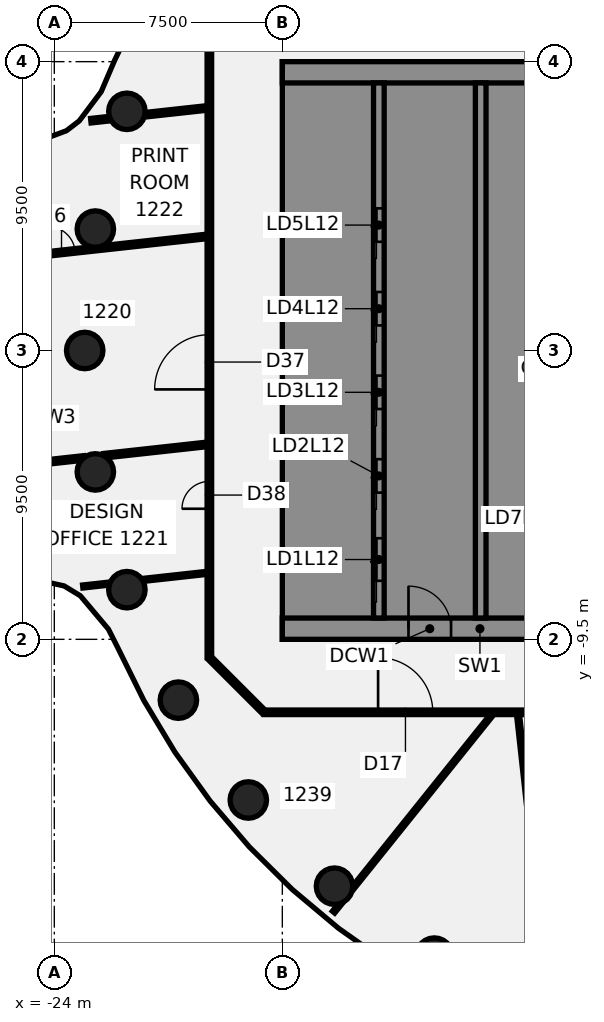
"""IFC4 building model, lengths in metres.
Left out: names, types, materials, properties, quantities, classifications, styles, units other than length and angle.
Written with IfcOpenShell. Run it as: python <this file> out.ifc"""

import sys

from ifc_helpers import new_model, si_unit, direction, frame, frame_2d, origin, origin_2d, place, context, subcontext, project, spatial, polyline, rectangle, circle, outline, extrude, element, fill, save


model = new_model("IFC4")
c1 = context("Model", 3, precision=1e-05, world=origin(), true_north=direction((0.0, 1.0)))
c2 = subcontext(c1, "Body", "Model", "MODEL_VIEW")
j1 = project(units=[si_unit("LENGTHUNIT", "METRE"), si_unit("PLANEANGLEUNIT", "RADIAN")], contexts=[c1])
p1 = place(None, origin())
s1 = spatial("IfcSite", under=j1, at=p1, CompositionType="ELEMENT")
p2 = place(p1, origin())
s2 = spatial("IfcBuilding", under=s1, at=p2, CompositionType="ELEMENT")
p3 = place(p2, frame((0.0, 0.0, 56.5)))
s3 = spatial("IfcBuildingStorey", under=s2, at=p3, CompositionType="ELEMENT", Elevation=56.5)
for number, where, z_axis, x_axis in (
    (1, (-21.613, 7.866, -0.14), (0.0, 0.0, 1.0), (1.0, 0.0, 0.0)),
    (2, (-22.651, 3.994, -0.14), (0.0, 0.0, 1.0), (1.0, 0.0, 0.0)),
    (3, (-23.0, 0.0, -0.14), (0.0, 0.0, 1.0), (1.0, 0.0, 0.0)),
    (4, (-22.651, -3.994, -0.14), (0.0, 0.0, 1.0), (1.0, 0.0, 0.0)),
    (5, (-21.613, -7.866, -0.14), (0.0, 0.0, 1.0), (1.0, 0.0, 0.0)),
    (6, (-19.919, -11.5, -0.14), (0.0, 0.0, 1.0), (1.0, 0.0, 0.0)),
    (7, (-17.619, -14.784, -0.14), (0.0, 0.0, 1.0), (1.0, 0.0, 0.0)),
    (8, (-14.784, -17.619, -0.14), (0.0, 0.0, 1.0), (1.0, 0.0, 0.0)),
    (9, (-11.5, -19.919, -0.14), (0.0, 0.0, 1.0), (1.0, 0.0, 0.0)),
):
    element("IfcColumn", number, at=place(p3, frame(where, z_axis=z_axis, x_axis=x_axis)), inside=s3, PredefinedType="COLUMN", context=c2, shape_type="SweptSolid", body=[
        extrude(circle(Radius=0.6, at=origin_2d()), origin(), (0.0, 0.0, 1.0), 3.75),
    ])
p4 = place(p3, frame((-8.748, -11.965, 0.0), z_axis=(0.0, 0.0, 1.0), x_axis=(0.109150907267, -0.994025190547, 0.0)))
e10 = element("IfcWall", 10, at=p4, inside=s3, PredefinedType="PARTITIONING", context=c2, shape_type="SweptSolid", body=[
    extrude(rectangle(XDim=9.124, YDim=0.1, at=frame_2d((4.562, 0.0))), origin(), (0.0, 0.0, 1.0), 3.01),
])
p5 = place(p3, frame((-18.872, -10.128, 0.0), z_axis=(0.0, 0.0, 1.0), x_axis=(0.707106781187, -0.707106781187, 0.0)))
e11 = element("IfcWall", 11, at=p5, inside=s3, PredefinedType="PARTITIONING", context=c2, shape_type="SweptSolid", body=[
    extrude(rectangle(XDim=2.465, YDim=0.15, at=frame_2d((1.232, 0.0))), origin(), (0.0, 0.0, 1.0), 3.01),
])
p6 = place(p3, frame((-17.1, -11.9, 0.0), z_axis=(0.0, 0.0, 1.0), x_axis=(1.0, 0.0, 0.0)))
e12 = element("IfcWall", 12, at=p6, inside=s3, PredefinedType="PARTITIONING", context=c2, shape_type="SweptSolid", body=[
    extrude(rectangle(XDim=34.165, YDim=0.15, at=frame_2d((17.083, 0.0))), origin(), (0.0, 0.0, 1.0), 3.01),
])
p7 = place(p6, frame((15.12, 0.0, 0.0)))
e13 = element("IfcOpeningElement", 13, at=p7, cuts=e12, PredefinedType="OPENING", context=c2, shape_type="SweptSolid", body=[
    extrude(rectangle(XDim=1.8, YDim=2.1, at=frame_2d((0.9, 1.05))), frame((0.0, 0.085, 0.0), z_axis=(0.0, -1.0, 0.0), x_axis=(1.0, 0.0, 0.0)), (0.0, 0.0, 1.0), 0.17),
])
p8 = place(p6, frame((3.75, 0.0, 0.0)))
e14 = element("IfcOpeningElement", 14, at=p8, cuts=e12, PredefinedType="OPENING", context=c2, shape_type="SweptSolid", body=[
    extrude(rectangle(XDim=1.8, YDim=2.1, at=frame_2d((0.9, 1.05))), frame((0.0, 0.085, 0.0), z_axis=(0.0, -1.0, 0.0), x_axis=(1.0, 0.0, 0.0)), (0.0, 0.0, 1.0), 0.17),
])
p9 = place(p6, frame((26.936, 0.0, 0.0)))
e15 = element("IfcOpeningElement", 15, at=p9, cuts=e12, PredefinedType="OPENING", context=c2, shape_type="SweptSolid", body=[
    extrude(rectangle(XDim=1.8, YDim=2.1, at=frame_2d((0.9, 1.05))), frame((0.0, 0.085, 0.0), z_axis=(0.0, -1.0, 0.0), x_axis=(1.0, 0.0, 0.0)), (0.0, 0.0, 1.0), 0.17),
])
p10 = place(p3, frame((-26.05, 2.976, 0.0), z_axis=(0.0, 0.0, 1.0), x_axis=(0.994023698867, 0.109164490982, 0.0)))
e16 = element("IfcWall", 16, at=p10, inside=s3, PredefinedType="PARTITIONING", context=c2, shape_type="SweptSolid", body=[
    extrude(rectangle(XDim=7.127, YDim=0.15, at=frame_2d((3.564, 0.0))), origin(), (0.0, 0.0, 1.0), 3.01),
])
p11 = place(p10, frame((1.85, 0.0, 0.0)))
e17 = element("IfcOpeningElement", 17, at=p11, cuts=e16, PredefinedType="OPENING", context=c2, shape_type="SweptSolid", body=[
    extrude(rectangle(XDim=0.9, YDim=2.1, at=frame_2d((0.45, 1.05))), frame((0.0, 0.085, 0.0), z_axis=(0.0, -1.0, 0.0), x_axis=(1.0, 0.0, 0.0)), (0.0, 0.0, 1.0), 0.17),
])
p12 = place(p3, frame((-25.307, -3.784, 0.0), z_axis=(0.0, 0.0, 1.0), x_axis=(0.994013939251, 0.10925332295, 0.0)))
e18 = element("IfcWall", 18, at=p12, inside=s3, PredefinedType="PARTITIONING", context=c2, shape_type="SweptSolid", body=[
    extrude(rectangle(XDim=2.297, YDim=0.15, at=frame_2d((1.148, 0.0))), origin(), (0.0, 0.0, 1.0), 3.01),
])
p13 = place(p3, frame((-22.364, -3.461, 0.0), z_axis=(0.0, 0.0, 1.0), x_axis=(0.994017073769, 0.109224800551, 0.0)))
e19 = element("IfcWall", 19, at=p13, inside=s3, PredefinedType="PARTITIONING", context=c2, shape_type="SweptSolid", body=[
    extrude(rectangle(XDim=3.42, YDim=0.15, at=frame_2d((1.71, 0.0))), origin(), (0.0, 0.0, 1.0), 3.01),
])
p14 = place(p3, frame((-23.065, -7.763, 0.0), z_axis=(0.0, 0.0, 1.0), x_axis=(0.993995521714, 0.109420760428, 0.0)))
e20 = element("IfcWall", 20, at=p14, inside=s3, PredefinedType="PARTITIONING", context=c2, shape_type="SweptSolid", body=[
    extrude(rectangle(XDim=0.901, YDim=0.1, at=frame_2d((0.451, 0.0))), origin(), (0.0, 0.0, 1.0), 3.01),
])
p15 = place(p3, frame((-21.099, -7.547, 0.0), z_axis=(0.0, 0.0, 1.0), x_axis=(0.994002378956, 0.109358450201, 0.0)))
e21 = element("IfcWall", 21, at=p15, inside=s3, PredefinedType="PARTITIONING", context=c2, shape_type="SweptSolid", body=[
    extrude(rectangle(XDim=2.148, YDim=0.1, at=frame_2d((1.074, 0.0))), origin(), (0.0, 0.0, 1.0), 3.01),
])
p16 = place(p3, frame((-22.799, 7.558, 0.0), z_axis=(0.0, 0.0, 1.0), x_axis=(0.994017126998, 0.10922431613, 0.0)))
e22 = element("IfcWall", 22, at=p16, inside=s3, PredefinedType="PARTITIONING", context=c2, shape_type="SweptSolid", body=[
    extrude(rectangle(XDim=0.644, YDim=0.15, at=frame_2d((0.322, 0.0))), origin(), (0.0, 0.0, 1.0), 3.01),
])
p17 = place(p3, frame((-21.034, 7.752, 0.0), z_axis=(0.0, 0.0, 1.0), x_axis=(0.994020279747, 0.109195620111, 0.0)))
e23 = element("IfcWall", 23, at=p17, inside=s3, PredefinedType="PARTITIONING", context=c2, shape_type="SweptSolid", body=[
    extrude(rectangle(XDim=2.082, YDim=0.15, at=frame_2d((1.041, 0.0))), origin(), (0.0, 0.0, 1.0), 3.01),
])
p18 = place(p3, frame((-14.816, -18.473, 0.0), z_axis=(0.0, 0.0, 1.0), x_axis=(0.625701600065, 0.780062502416, 0.0)))
e24 = element("IfcWall", 24, at=p18, inside=s3, PredefinedType="PARTITIONING", context=c2, shape_type="SweptSolid", body=[
    extrude(rectangle(XDim=0.384, YDim=0.1, at=frame_2d((0.192, 0.0))), origin(), (0.0, 0.0, 1.0), 3.01),
])
p19 = place(p3, frame((-14.196, -17.699, 0.0), z_axis=(0.0, 0.0, 1.0), x_axis=(0.625695219995, 0.780067619938, 0.0)))
e25 = element("IfcWall", 25, at=p19, inside=s3, PredefinedType="PARTITIONING", context=c2, shape_type="SweptSolid", body=[
    extrude(rectangle(XDim=7.319, YDim=0.1, at=frame_2d((3.66, 0.0))), origin(), (0.0, 0.0, 1.0), 3.01),
])
p20 = place(p3, frame((-18.9, -10.1, 0.0), z_axis=(0.0, 0.0, 1.0), x_axis=(0.0, 1.0, 0.0)))
e26 = element("IfcWall", 26, at=p20, inside=s3, PredefinedType="PARTITIONING", context=c2, shape_type="SweptSolid", body=[
    extrude(rectangle(XDim=20.2, YDim=0.15, at=frame_2d((10.1, 0.0))), origin(), (0.0, 0.0, 1.0), 3.01),
])
p21 = place(p20, frame((8.82, 0.0, 0.0)))
e27 = element("IfcOpeningElement", 27, at=p21, cuts=e26, PredefinedType="OPENING", context=c2, shape_type="SweptSolid", body=[
    extrude(rectangle(XDim=1.8, YDim=2.1, at=frame_2d((0.9, 1.05))), frame((0.0, 0.085, 0.0), z_axis=(0.0, -1.0, 0.0), x_axis=(1.0, 0.0, 0.0)), (0.0, 0.0, 1.0), 0.17),
])
p22 = place(p20, frame((4.895, 0.0, 0.0)))
e28 = element("IfcOpeningElement", 28, at=p22, cuts=e26, PredefinedType="OPENING", context=c2, shape_type="SweptSolid", body=[
    extrude(rectangle(XDim=0.9, YDim=2.1, at=frame_2d((0.45, 1.05))), frame((0.0, 0.085, 0.0), z_axis=(0.0, -1.0, 0.0), x_axis=(1.0, 0.0, 0.0)), (0.0, 0.0, 1.0), 0.17),
])
p23 = place(p3, frame((-16.5, -9.15, 0.0), z_axis=(0.0, 0.0, 1.0), x_axis=(1.0, 0.0, 0.0)))
e29 = element("IfcWall", 29, at=p23, inside=s3, PredefinedType="SHEAR", context=c2, shape_type="SweptSolid", body=[
    extrude(rectangle(XDim=13.0, YDim=0.7, at=frame_2d((6.5, 0.0))), origin(), (0.0, 0.0, 1.0), 3.61),
])
p24 = place(p23, frame((4.15, 0.0, 0.0)))
e30 = element("IfcOpeningElement", 30, at=p24, cuts=e29, PredefinedType="OPENING", context=c2, shape_type="SweptSolid", body=[
    extrude(rectangle(XDim=1.4, YDim=2.1, at=frame_2d((0.7, 1.05))), frame((0.0, 0.36, 0.0), z_axis=(0.0, -1.0, 0.0), x_axis=(1.0, 0.0, 0.0)), (0.0, 0.0, 1.0), 0.72),
])
p25 = place(p23, frame((10.125, 0.0, 0.0)))
e31 = element("IfcOpeningElement", 31, at=p25, cuts=e29, PredefinedType="OPENING", context=c2, shape_type="SweptSolid", body=[
    extrude(rectangle(XDim=1.4, YDim=2.1, at=frame_2d((0.7, 1.05))), frame((0.0, 0.36, 0.0), z_axis=(0.0, -1.0, 0.0), x_axis=(1.0, 0.0, 0.0)), (0.0, 0.0, 1.0), 0.72),
])
p26 = place(p3, origin())
e32 = element("IfcWall", 32, at=p26, inside=s3, PredefinedType="SHEAR", context=c2, shape_type="SweptSolid", body=[
    extrude(outline(polyline([(-13.5, -8.8), (-13.5, -8.125), (-15.8, -8.125), (-15.8, -5.625), (-13.5, -5.625), (-13.5, -5.375), (-15.8, -5.375), (-15.8, -2.875), (-13.5, -2.875), (-13.5, -2.625), (-15.8, -2.625), (-15.8, -0.125), (-13.5, -0.125), (-13.5, 0.125), (-15.8, 0.125), (-15.8, 2.625), (-13.5, 2.625), (-13.5, 2.875), (-15.8, 2.875), (-15.8, 5.375), (-13.5, 5.375), (-13.5, 5.625), (-15.8, 5.625), (-15.8, 8.125), (-13.5, 8.125), (-13.5, 8.8), (-15.8, 8.8), (-16.5, 8.8), (-16.5, -8.8), (-15.8, -8.8), (-13.5, -8.8)])), origin(), (0.0, 0.0, 1.0), 3.61),
])
p27 = place(p3, frame((-16.5, 9.15, 0.0), z_axis=(0.0, 0.0, 1.0), x_axis=(1.0, 0.0, 0.0)))
e33 = element("IfcWall", 33, at=p27, inside=s3, PredefinedType="SHEAR", context=c2, shape_type="SweptSolid", body=[
    extrude(rectangle(XDim=13.0, YDim=0.7, at=frame_2d((6.5, 0.0))), origin(), (0.0, 0.0, 1.0), 3.61),
])
p28 = place(p3, origin())
e34 = element("IfcWall", 34, at=p28, inside=s3, PredefinedType="SHEAR", context=c2, shape_type="SweptSolid", body=[
    extrude(outline(polyline([(-9.8, -5.375), (-9.8, -5.625), (-7.5, -5.625), (-7.15, -5.625), (-7.15, 8.8), (-7.5, 8.8), (-9.8, 8.8), (-9.8, 8.125), (-7.5, 8.125), (-7.5, 5.625), (-9.8, 5.625), (-9.8, 5.375), (-7.5, 5.375), (-7.5, 2.875), (-9.8, 2.875), (-9.8, 2.625), (-7.5, 2.625), (-7.5, 0.125), (-9.8, 0.125), (-9.8, -0.125), (-7.5, -0.125), (-7.5, -2.625), (-9.8, -2.625), (-9.8, -2.875), (-7.5, -2.875), (-7.5, -5.375), (-9.8, -5.375)])), origin(), (0.0, 0.0, 1.0), 3.61),
])
p29 = place(p3, origin())
e35 = element("IfcWall", 35, at=p29, inside=s3, PredefinedType="SHEAR", context=c2, shape_type="SweptSolid", body=[
    extrude(outline(polyline([(-7.5, -8.125), (-9.55, -8.125), (-9.55, -5.625), (-9.8, -5.625), (-9.8, -8.125), (-9.8, -8.8), (-7.5, -8.8), (-7.5, -8.125)])), origin(), (0.0, 0.0, 1.0), 3.61),
])
p30 = place(p3, frame((-13.325, -8.8, 0.0), z_axis=(0.0, 0.0, 1.0), x_axis=(0.0, 1.0, 0.0)))
e36 = element("IfcWall", 36, at=p30, inside=s3, PredefinedType="SHEAR", context=c2, shape_type="SweptSolid", body=[
    extrude(rectangle(XDim=17.6, YDim=0.35, at=frame_2d((8.8, 0.0))), origin(), (0.0, 0.0, 1.0), 3.61),
])
p31 = place(p30, frame((1.225, 0.0, 0.0)))
e37 = element("IfcOpeningElement", 37, at=p31, cuts=e36, PredefinedType="OPENING", context=c2, shape_type="SweptSolid", body=[
    extrude(rectangle(XDim=1.4, YDim=2.1, at=frame_2d((0.7, 1.05))), frame((0.0, 0.185, 0.0), z_axis=(0.0, -1.0, 0.0), x_axis=(1.0, 0.0, 0.0)), (0.0, 0.0, 1.0), 0.37),
])
p32 = place(p30, frame((4.125, 0.0, 0.0)))
e38 = element("IfcOpeningElement", 38, at=p32, cuts=e36, PredefinedType="OPENING", context=c2, shape_type="SweptSolid", body=[
    extrude(rectangle(XDim=1.1, YDim=2.1, at=frame_2d((0.55, 1.05))), frame((0.0, 0.185, 0.0), z_axis=(0.0, -1.0, 0.0), x_axis=(1.0, 0.0, 0.0)), (0.0, 0.0, 1.0), 0.37),
])
p33 = place(p30, frame((6.875, 0.0, 0.0)))
e39 = element("IfcOpeningElement", 39, at=p33, cuts=e36, PredefinedType="OPENING", context=c2, shape_type="SweptSolid", body=[
    extrude(rectangle(XDim=1.1, YDim=2.1, at=frame_2d((0.55, 1.05))), frame((0.0, 0.185, 0.0), z_axis=(0.0, -1.0, 0.0), x_axis=(1.0, 0.0, 0.0)), (0.0, 0.0, 1.0), 0.37),
])
p34 = place(p30, frame((9.625, 0.0, 0.0)))
e40 = element("IfcOpeningElement", 40, at=p34, cuts=e36, PredefinedType="OPENING", context=c2, shape_type="SweptSolid", body=[
    extrude(rectangle(XDim=1.1, YDim=2.1, at=frame_2d((0.55, 1.05))), frame((0.0, 0.185, 0.0), z_axis=(0.0, -1.0, 0.0), x_axis=(1.0, 0.0, 0.0)), (0.0, 0.0, 1.0), 0.37),
])
p35 = place(p30, frame((12.375, 0.0, 0.0)))
e41 = element("IfcOpeningElement", 41, at=p35, cuts=e36, PredefinedType="OPENING", context=c2, shape_type="SweptSolid", body=[
    extrude(rectangle(XDim=1.1, YDim=2.1, at=frame_2d((0.55, 1.05))), frame((0.0, 0.185, 0.0), z_axis=(0.0, -1.0, 0.0), x_axis=(1.0, 0.0, 0.0)), (0.0, 0.0, 1.0), 0.37),
])
p36 = place(p3, frame((-9.975, -8.8, 0.0), z_axis=(0.0, 0.0, 1.0), x_axis=(0.0, 1.0, 0.0)))
e42 = element("IfcWall", 42, at=p36, inside=s3, PredefinedType="SHEAR", context=c2, shape_type="SweptSolid", body=[
    extrude(rectangle(XDim=17.6, YDim=0.35, at=frame_2d((8.8, 0.0))), origin(), (0.0, 0.0, 1.0), 3.61),
])
p37 = place(p8, frame((1.8, 0.0, 0.0), z_axis=(0.0, 0.0, 1.0), x_axis=(-1.0, 0.0, 0.0)))
e43 = element("IfcDoor", 43, at=p37, inside=s3, OperationType="DOUBLE_DOOR_SINGLE_SWING", PredefinedType="DOOR", context=c2, shape_type="SweptSolid", body=[
    extrude(rectangle(XDim=1.8, YDim=2.1, at=frame_2d((0.9, 1.05))), frame((0.0, 0.025, 0.0), z_axis=(0.0, -1.0, 0.0), x_axis=(1.0, 0.0, 0.0)), (0.0, 0.0, 1.0), 0.05),
])
fill(e14, e43)
p38 = place(p11, origin())
e44 = element("IfcDoor", 44, at=p38, inside=s3, OperationType="SINGLE_SWING_RIGHT", PredefinedType="DOOR", context=c2, shape_type="SweptSolid", body=[
    extrude(rectangle(XDim=0.9, YDim=2.1, at=frame_2d((0.45, 1.05))), frame((0.0, 0.025, 0.0), z_axis=(0.0, -1.0, 0.0), x_axis=(1.0, 0.0, 0.0)), (0.0, 0.0, 1.0), 0.05),
])
fill(e17, e44)
p39 = place(p21, frame((1.8, 0.0, 0.0), z_axis=(0.0, 0.0, 1.0), x_axis=(-1.0, 0.0, 0.0)))
e45 = element("IfcDoor", 45, at=p39, inside=s3, OperationType="DOUBLE_DOOR_SINGLE_SWING", PredefinedType="DOOR", context=c2, shape_type="SweptSolid", body=[
    extrude(rectangle(XDim=1.8, YDim=2.1, at=frame_2d((0.9, 1.05))), frame((0.0, 0.025, 0.0), z_axis=(0.0, -1.0, 0.0), x_axis=(1.0, 0.0, 0.0)), (0.0, 0.0, 1.0), 0.05),
])
fill(e27, e45)
p40 = place(p22, origin())
e46 = element("IfcDoor", 46, at=p40, inside=s3, OperationType="SINGLE_SWING_RIGHT", PredefinedType="DOOR", context=c2, shape_type="SweptSolid", body=[
    extrude(rectangle(XDim=0.9, YDim=2.1, at=frame_2d((0.45, 1.05))), frame((0.0, 0.025, 0.0), z_axis=(0.0, -1.0, 0.0), x_axis=(1.0, 0.0, 0.0)), (0.0, 0.0, 1.0), 0.05),
])
fill(e28, e46)
p41 = place(p24, origin())
e47 = element("IfcDoor", 47, at=p41, inside=s3, OperationType="SINGLE_SWING_LEFT", PredefinedType="DOOR", context=c2, shape_type="SweptSolid", body=[
    extrude(rectangle(XDim=1.4, YDim=2.1, at=frame_2d((0.7, 1.05))), frame((0.0, 0.025, 0.0), z_axis=(0.0, -1.0, 0.0), x_axis=(1.0, 0.0, 0.0)), (0.0, 0.0, 1.0), 0.05),
])
fill(e30, e47)
p42 = place(p31, origin())
e48 = element("IfcDoor", 48, at=p42, inside=s3, OperationType="SLIDING_TO_LEFT", PredefinedType="DOOR", context=c2, shape_type="SweptSolid", body=[
    extrude(rectangle(XDim=1.4, YDim=2.1, at=frame_2d((0.7, 1.05))), frame((0.0, 0.025, 0.0), z_axis=(0.0, -1.0, 0.0), x_axis=(1.0, 0.0, 0.0)), (0.0, 0.0, 1.0), 0.05),
])
fill(e37, e48)
p43 = place(p32, origin())
e49 = element("IfcDoor", 49, at=p43, inside=s3, OperationType="SLIDING_TO_LEFT", PredefinedType="DOOR", context=c2, shape_type="SweptSolid", body=[
    extrude(rectangle(XDim=1.1, YDim=2.1, at=frame_2d((0.55, 1.05))), frame((0.0, 0.025, 0.0), z_axis=(0.0, -1.0, 0.0), x_axis=(1.0, 0.0, 0.0)), (0.0, 0.0, 1.0), 0.05),
])
fill(e38, e49)
p44 = place(p33, origin())
e50 = element("IfcDoor", 50, at=p44, inside=s3, OperationType="SLIDING_TO_LEFT", PredefinedType="DOOR", context=c2, shape_type="SweptSolid", body=[
    extrude(rectangle(XDim=1.1, YDim=2.1, at=frame_2d((0.55, 1.05))), frame((0.0, 0.025, 0.0), z_axis=(0.0, -1.0, 0.0), x_axis=(1.0, 0.0, 0.0)), (0.0, 0.0, 1.0), 0.05),
])
fill(e39, e50)
p45 = place(p34, origin())
e51 = element("IfcDoor", 51, at=p45, inside=s3, OperationType="SLIDING_TO_LEFT", PredefinedType="DOOR", context=c2, shape_type="SweptSolid", body=[
    extrude(rectangle(XDim=1.1, YDim=2.1, at=frame_2d((0.55, 1.05))), frame((0.0, 0.025, 0.0), z_axis=(0.0, -1.0, 0.0), x_axis=(1.0, 0.0, 0.0)), (0.0, 0.0, 1.0), 0.05),
])
fill(e40, e51)
p46 = place(p35, origin())
e52 = element("IfcDoor", 52, at=p46, inside=s3, OperationType="SLIDING_TO_LEFT", PredefinedType="DOOR", context=c2, shape_type="SweptSolid", body=[
    extrude(rectangle(XDim=1.1, YDim=2.1, at=frame_2d((0.55, 1.05))), frame((0.0, 0.025, 0.0), z_axis=(0.0, -1.0, 0.0), x_axis=(1.0, 0.0, 0.0)), (0.0, 0.0, 1.0), 0.05),
])
fill(e41, e52)
save(model, sys.argv[1])
